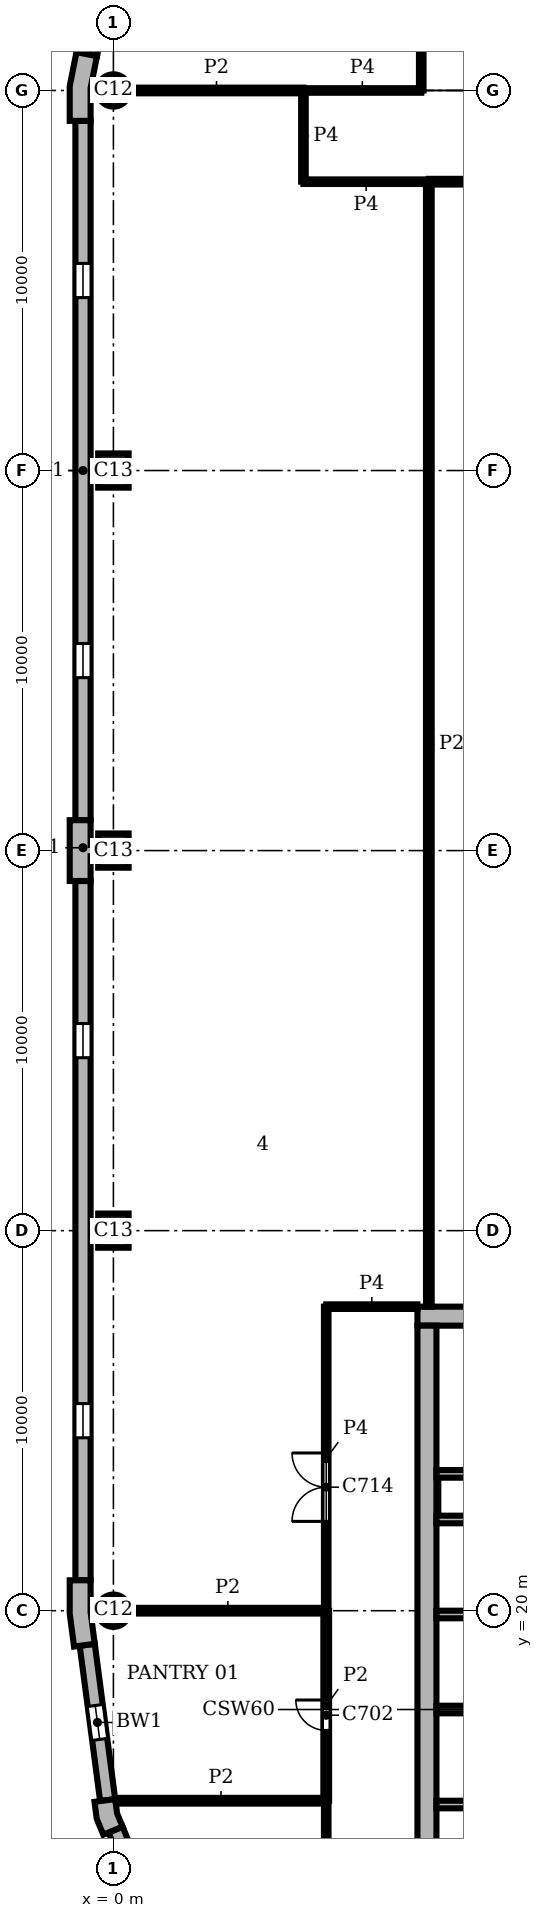
"""IFC4 building model, lengths in metres.
Left out: names, types, materials, properties, quantities, classifications, styles, units other than length and angle.
Written with IfcOpenShell. Run it as: python <this file> out.ifc"""

import sys

from ifc_helpers import new_model, si_unit, direction, frame, frame_2d, origin, origin_2d, place, context, subcontext, project, spatial, polyline, rectangle, circle, outline, extrude, element, fill, save


model = new_model("IFC4")
c1 = context("Model", 3, precision=1e-05, world=origin(), true_north=direction((0.0, 1.0)))
c2 = subcontext(c1, "Body", "Model", "MODEL_VIEW")
j1 = project(units=[si_unit("LENGTHUNIT", "METRE"), si_unit("PLANEANGLEUNIT", "RADIAN")], contexts=[c1])
p1 = place(None, origin())
s1 = spatial("IfcSite", under=j1, at=p1, CompositionType="ELEMENT")
p2 = place(p1, origin())
s2 = spatial("IfcBuilding", under=s1, at=p2, CompositionType="ELEMENT")
p3 = place(p2, frame((0.0, 0.0, 306.0)))
s3 = spatial("IfcBuildingStorey", under=s2, at=p3, CompositionType="ELEMENT", Elevation=306.0)
p4 = place(p3, frame((0.0, 60.0, 0.0), z_axis=(0.0, 0.0, 1.0), x_axis=(1.0, 0.0, 0.0)))
e1 = element("IfcColumn", 1, at=p4, inside=s3, PredefinedType="COLUMN", context=c2, shape_type="SweptSolid", body=[
    extrude(circle(Radius=0.425, at=origin_2d()), origin(), (0.0, 0.0, 1.0), 3.9),
])
for number, where, z_axis, x_axis in (
    (2, (0.0, 50.0, 0.0), (0.0, 0.0, 1.0), (0.0, 1.0, 0.0)),
    (3, (0.0, 40.0, 0.0), (0.0, 0.0, 1.0), (0.0, 1.0, 0.0)),
    (4, (0.0, 30.0, 0.0), (0.0, 0.0, 1.0), (0.0, 1.0, 0.0)),
):
    element("IfcColumn", number, at=place(p3, frame(where, z_axis=z_axis, x_axis=x_axis)), inside=s3, PredefinedType="COLUMN", context=c2, shape_type="SweptSolid", body=[
        extrude(rectangle(XDim=0.9, YDim=0.8, at=origin_2d()), origin(), (0.0, 0.0, 1.0), 3.9),
    ])
p5 = place(p3, frame((0.0, 20.0, 0.0), z_axis=(0.0, 0.0, 1.0), x_axis=(1.0, 0.0, 0.0)))
e5 = element("IfcColumn", 5, at=p5, inside=s3, PredefinedType="COLUMN", context=c2, shape_type="SweptSolid", body=[
    extrude(circle(Radius=0.425, at=origin_2d()), origin(), (0.0, 0.0, 1.0), 3.9),
])
p6 = place(p3, frame((28.0, 27.75, 0.0), z_axis=(0.0, 0.0, 1.0), x_axis=(-1.0, 0.0, 0.0)))
e6 = element("IfcWall", 6, at=p6, inside=s3, PredefinedType="SHEAR", context=c2, shape_type="SweptSolid", body=[
    extrude(rectangle(XDim=20.0, YDim=0.5, at=frame_2d((10.0, 0.0))), origin(), (0.0, 0.0, 1.0), 3.9),
])
p7 = place(p3, frame((8.25, 27.5, 0.0), z_axis=(0.0, 0.0, 1.0), x_axis=(0.0, -1.0, 0.0)))
e7 = element("IfcWall", 7, at=p7, inside=s3, PredefinedType="SHEAR", context=c2, shape_type="SweptSolid", body=[
    extrude(rectangle(XDim=19.0, YDim=0.5, at=frame_2d((9.5, 0.0))), origin(), (0.0, 0.0, 1.0), 3.9),
])
p8 = place(p3, origin())
e8 = element("IfcWall", 8, at=p8, inside=s3, PredefinedType="SOLIDWALL", context=c2, shape_type="SweptSolid", body=[
    extrude(outline(polyline([(-0.825, 60.98), (-0.972, 61.009), (-1.15, 60.113), (-1.15, 59.2), (-1.0, 59.2), (-0.6, 59.2), (-0.6, 60.059), (-0.432, 60.902), (-0.825, 60.98)])), origin(), (0.0, 0.0, 1.0), 3.9),
])
e9 = element("IfcWall", 9, at=p8, inside=s3, PredefinedType="SOLIDWALL", context=c2, shape_type="SweptSolid", body=[
    extrude(outline(polyline([(-0.6, 39.2), (-0.6, 39.85), (-0.45, 39.85), (-0.45, 40.15), (-0.6, 40.15), (-0.6, 40.8), (-1.0, 40.8), (-1.15, 40.8), (-1.15, 40.0), (-1.15, 39.2), (-1.0, 39.2), (-0.6, 39.2)])), origin(), (0.0, 0.0, 1.0), 3.9),
])
e10 = element("IfcWall", 10, at=p8, inside=s3, PredefinedType="SOLIDWALL", context=c2, shape_type="SweptSolid", body=[
    extrude(outline(polyline([(-1.0, 20.8), (-1.15, 20.8), (-1.15, 19.925), (-1.036, 19.057), (-0.887, 19.076), (-0.49, 19.128), (-0.6, 19.961), (-0.6, 20.8), (-1.0, 20.8)])), origin(), (0.0, 0.0, 1.0), 3.9),
])
e11 = element("IfcWall", 11, at=p8, inside=s3, PredefinedType="SOLIDWALL", context=c2, shape_type="SweptSolid", body=[
    extrude(outline(polyline([(-0.349, 14.99), (-0.498, 14.971), (-0.439, 14.523), (-0.266, 14.106), (-0.128, 14.164), (0.242, 14.317), (0.097, 14.667), (0.047, 15.043), (-0.349, 14.99)])), origin(), (0.0, 0.0, 1.0), 3.9),
])
p9 = place(p3, frame((0.299, 65.602, 0.0), z_axis=(0.0, 0.0, 1.0), x_axis=(-0.195098533057, -0.98078364709, 0.0)))
e12 = element("IfcWall", 12, at=p9, inside=s3, PredefinedType="SOLIDWALL", context=c2, shape_type="SweptSolid", body=[
    extrude(rectangle(XDim=4.753, YDim=0.4, at=frame_2d((2.376, 0.0))), origin(), (0.0, 0.0, 1.0), 3.9),
])
p10 = place(p9, frame((0.226, 0.0, 0.9)))
e13 = element("IfcOpeningElement", 13, at=p10, cuts=e12, PredefinedType="OPENING", context=c2, shape_type="SweptSolid", body=[
    extrude(rectangle(XDim=4.3, YDim=2.35, at=frame_2d((2.15, 1.175))), frame((0.0, 0.21, 0.0), z_axis=(0.0, -1.0, 0.0), x_axis=(1.0, 0.0, 0.0)), (0.0, 0.0, 1.0), 0.42),
])
p11 = place(p3, frame((-0.8, 59.2, 0.0), z_axis=(0.0, 0.0, 1.0), x_axis=(0.0, -1.0, 0.0)))
e14 = element("IfcWall", 14, at=p11, inside=s3, PredefinedType="SOLIDWALL", context=c2, shape_type="SweptSolid", body=[
    extrude(rectangle(XDim=18.4, YDim=0.4, at=frame_2d((9.2, 0.0))), origin(), (0.0, 0.0, 1.0), 3.9),
])
p12 = place(p11, frame((3.75, 0.0, 0.9)))
e15 = element("IfcOpeningElement", 15, at=p12, cuts=e14, PredefinedType="OPENING", context=c2, shape_type="SweptSolid", body=[
    extrude(rectangle(XDim=0.9, YDim=2.35, at=frame_2d((0.45, 1.175))), frame((0.0, 0.21, 0.0), z_axis=(0.0, -1.0, 0.0), x_axis=(1.0, 0.0, 0.0)), (0.0, 0.0, 1.0), 0.42),
])
p13 = place(p11, frame((13.75, 0.0, 0.9)))
e16 = element("IfcOpeningElement", 16, at=p13, cuts=e14, PredefinedType="OPENING", context=c2, shape_type="SweptSolid", body=[
    extrude(rectangle(XDim=0.9, YDim=2.35, at=frame_2d((0.45, 1.175))), frame((0.0, 0.21, 0.0), z_axis=(0.0, -1.0, 0.0), x_axis=(1.0, 0.0, 0.0)), (0.0, 0.0, 1.0), 0.42),
])
p14 = place(p3, frame((-0.8, 39.2, 0.0), z_axis=(0.0, 0.0, 1.0), x_axis=(0.0, -1.0, 0.0)))
e17 = element("IfcWall", 17, at=p14, inside=s3, PredefinedType="SOLIDWALL", context=c2, shape_type="SweptSolid", body=[
    extrude(rectangle(XDim=18.4, YDim=0.4, at=frame_2d((9.2, 0.0))), origin(), (0.0, 0.0, 1.0), 3.9),
])
p15 = place(p14, frame((3.75, 0.0, 0.9)))
e18 = element("IfcOpeningElement", 18, at=p15, cuts=e17, PredefinedType="OPENING", context=c2, shape_type="SweptSolid", body=[
    extrude(rectangle(XDim=0.9, YDim=2.35, at=frame_2d((0.45, 1.175))), frame((0.0, 0.21, 0.0), z_axis=(0.0, -1.0, 0.0), x_axis=(1.0, 0.0, 0.0)), (0.0, 0.0, 1.0), 0.42),
])
p16 = place(p14, frame((13.75, 0.0, 0.9)))
e19 = element("IfcOpeningElement", 19, at=p16, cuts=e17, PredefinedType="OPENING", context=c2, shape_type="SweptSolid", body=[
    extrude(rectangle(XDim=0.9, YDim=2.35, at=frame_2d((0.45, 1.175))), frame((0.0, 0.21, 0.0), z_axis=(0.0, -1.0, 0.0), x_axis=(1.0, 0.0, 0.0)), (0.0, 0.0, 1.0), 0.42),
])
p17 = place(p3, frame((-0.689, 19.102, 0.0), z_axis=(0.0, 0.0, 1.0), x_axis=(0.130514280502, -0.991446429508, 0.0)))
e20 = element("IfcWall", 20, at=p17, inside=s3, PredefinedType="SOLIDWALL", context=c2, shape_type="SweptSolid", body=[
    extrude(rectangle(XDim=4.121, YDim=0.4, at=frame_2d((2.061, 0.0))), origin(), (0.0, 0.0, 1.0), 3.9),
])
p18 = place(p17, frame((1.611, 0.0, 0.9)))
e21 = element("IfcOpeningElement", 21, at=p18, cuts=e20, PredefinedType="OPENING", context=c2, shape_type="SweptSolid", body=[
    extrude(rectangle(XDim=0.9, YDim=2.35, at=frame_2d((0.45, 1.175))), frame((0.0, 0.21, 0.0), z_axis=(0.0, -1.0, 0.0), x_axis=(1.0, 0.0, 0.0)), (0.0, 0.0, 1.0), 0.42),
])
p19 = place(p3, frame((0.057, 14.24, 0.0), z_axis=(0.0, 0.0, 1.0), x_axis=(0.382721546029, -0.923863744394, 0.0)))
e22 = element("IfcWall", 22, at=p19, inside=s3, PredefinedType="SOLIDWALL", context=c2, shape_type="SweptSolid", body=[
    extrude(rectangle(XDim=4.121, YDim=0.4, at=frame_2d((2.061, 0.0))), origin(), (0.0, 0.0, 1.0), 3.9),
])
p20 = place(p19, frame((1.611, 0.0, 0.9)))
e23 = element("IfcOpeningElement", 23, at=p20, cuts=e22, PredefinedType="OPENING", context=c2, shape_type="SweptSolid", body=[
    extrude(rectangle(XDim=0.9, YDim=2.35, at=frame_2d((0.45, 1.175))), frame((0.0, 0.21, 0.0), z_axis=(0.0, -1.0, 0.0), x_axis=(1.0, 0.0, 0.0)), (0.0, 0.0, 1.0), 0.42),
])
for number, where, z_axis, x_axis in (
    (24, (8.5, 14.9, 0.0), (0.0, 0.0, 1.0), (1.0, 0.0, 0.0)),
    (25, (8.5, 17.4, 0.0), (0.0, 0.0, 1.0), (1.0, 0.0, 0.0)),
    (26, (8.5, 19.9, 0.0), (0.0, 0.0, 1.0), (1.0, 0.0, 0.0)),
    (27, (8.5, 22.4, 0.0), (0.0, 0.0, 1.0), (1.0, 0.0, 0.0)),
):
    element("IfcWall", number, at=place(p3, frame(where, z_axis=z_axis, x_axis=x_axis)), inside=s3, PredefinedType="SHEAR", context=c2, shape_type="SweptSolid", body=[
        extrude(rectangle(XDim=3.2, YDim=0.2, at=frame_2d((1.6, 0.0))), origin(), (0.0, 0.0, 1.0), 3.58),
    ])
p21 = place(p3, frame((8.5, 23.6, 0.0), z_axis=(0.0, 0.0, 1.0), x_axis=(1.0, 0.0, 0.0)))
e28 = element("IfcWall", 28, at=p21, inside=s3, PredefinedType="SHEAR", context=c2, shape_type="SweptSolid", body=[
    extrude(rectangle(XDim=5.3, YDim=0.2, at=frame_2d((2.65, 0.0))), origin(), (0.0, 0.0, 1.0), 3.58),
])
p22 = place(p3, frame((5.6, 15.0, 0.0), z_axis=(0.0, 0.0, 1.0), x_axis=(0.0, 1.0, 0.0)))
e29 = element("IfcWall", 29, at=p22, inside=s3, PredefinedType="PARTITIONING", context=c2, shape_type="SweptSolid", body=[
    extrude(rectangle(XDim=5.0, YDim=0.15, at=frame_2d((2.5, 0.0))), origin(), (0.0, 0.0, 1.0), 3.58),
])
p23 = place(p22, frame((1.85, 0.0, 0.0)))
e30 = element("IfcOpeningElement", 30, at=p23, cuts=e29, PredefinedType="OPENING", context=c2, shape_type="SweptSolid", body=[
    extrude(rectangle(XDim=0.8, YDim=2.1, at=frame_2d((0.4, 1.05))), frame((0.0, 0.085, 0.0), z_axis=(0.0, -1.0, 0.0), x_axis=(1.0, 0.0, 0.0)), (0.0, 0.0, 1.0), 0.17),
])
p24 = place(p3, frame((8.3, 28.0, 0.0), z_axis=(0.0, 0.0, 1.0), x_axis=(0.0, 1.0, 0.0)))
e31 = element("IfcWall", 31, at=p24, inside=s3, PredefinedType="PARTITIONING", context=c2, shape_type="SweptSolid", body=[
    extrude(rectangle(XDim=29.6, YDim=0.15, at=frame_2d((14.8, 0.0))), origin(), (0.0, 0.0, 1.0), 3.58),
])
p25 = place(p3, frame((0.063, 15.0, 0.0), z_axis=(0.0, 0.0, 1.0), x_axis=(1.0, 0.0, 0.0)))
e32 = element("IfcWall", 32, at=p25, inside=s3, PredefinedType="PARTITIONING", context=c2, shape_type="SweptSolid", body=[
    extrude(rectangle(XDim=5.537, YDim=0.15, at=frame_2d((2.769, 0.0))), origin(), (0.0, 0.0, 1.0), 3.58),
])
p26 = place(p3, frame((0.425, 20.0, 0.0), z_axis=(0.0, 0.0, 1.0), x_axis=(1.0, 0.0, 0.0)))
e33 = element("IfcWall", 33, at=p26, inside=s3, PredefinedType="PARTITIONING", context=c2, shape_type="SweptSolid", body=[
    extrude(rectangle(XDim=5.175, YDim=0.15, at=frame_2d((2.587, 0.0))), origin(), (0.0, 0.0, 1.0), 3.58),
])
p27 = place(p3, frame((8.3, 57.6, 0.0), z_axis=(0.0, 0.0, 1.0), x_axis=(1.0, 0.0, 0.0)))
e34 = element("IfcWall", 34, at=p27, inside=s3, PredefinedType="PARTITIONING", context=c2, shape_type="SweptSolid", body=[
    extrude(rectangle(XDim=5.5, YDim=0.15, at=frame_2d((2.75, 0.0))), origin(), (0.0, 0.0, 1.0), 3.58),
])
p28 = place(p3, frame((0.425, 60.0, 0.0), z_axis=(0.0, 0.0, 1.0), x_axis=(1.0, 0.0, 0.0)))
e35 = element("IfcWall", 35, at=p28, inside=s3, PredefinedType="PARTITIONING", context=c2, shape_type="SweptSolid", body=[
    extrude(rectangle(XDim=4.575, YDim=0.15, at=frame_2d((2.288, 0.0))), origin(), (0.0, 0.0, 1.0), 3.58),
])
p29 = place(p3, frame((5.0, 57.6, 0.0), z_axis=(0.0, 0.0, 1.0), x_axis=(0.0, 1.0, 0.0)))
e36 = element("IfcWall", 36, at=p29, inside=s3, PredefinedType="PARTITIONING", context=c2, shape_type="SweptSolid", body=[
    extrude(rectangle(XDim=2.4, YDim=0.12, at=frame_2d((1.2, 0.0))), origin(), (0.0, 0.0, 1.0), 3.58),
])
p30 = place(p3, frame((5.6, 5.6, 0.0), z_axis=(0.0, 0.0, 1.0), x_axis=(0.0, 1.0, 0.0)))
e37 = element("IfcWall", 37, at=p30, inside=s3, PredefinedType="PARTITIONING", context=c2, shape_type="SweptSolid", body=[
    extrude(rectangle(XDim=9.4, YDim=0.12, at=frame_2d((4.7, 0.0))), origin(), (0.0, 0.0, 1.0), 3.58),
])
p31 = place(p30, frame((5.35, 0.0, 0.0)))
e38 = element("IfcOpeningElement", 38, at=p31, cuts=e37, PredefinedType="OPENING", context=c2, shape_type="SweptSolid", body=[
    extrude(rectangle(XDim=1.0, YDim=2.1, at=frame_2d((0.5, 1.05))), frame((0.0, 0.07, 0.0), z_axis=(0.0, -1.0, 0.0), x_axis=(1.0, 0.0, 0.0)), (0.0, 0.0, 1.0), 0.14),
])
p32 = place(p3, frame((5.6, 20.0, 0.0), z_axis=(0.0, 0.0, 1.0), x_axis=(0.0, 1.0, 0.0)))
e39 = element("IfcWall", 39, at=p32, inside=s3, PredefinedType="PARTITIONING", context=c2, shape_type="SweptSolid", body=[
    extrude(rectangle(XDim=8.0, YDim=0.12, at=frame_2d((4.0, 0.0))), origin(), (0.0, 0.0, 1.0), 3.58),
])
p33 = place(p32, frame((2.35, 0.0, 0.0)))
e40 = element("IfcOpeningElement", 40, at=p33, cuts=e39, PredefinedType="OPENING", context=c2, shape_type="SweptSolid", body=[
    extrude(rectangle(XDim=1.8, YDim=2.1, at=frame_2d((0.9, 1.05))), frame((0.0, 0.07, 0.0), z_axis=(0.0, -1.0, 0.0), x_axis=(1.0, 0.0, 0.0)), (0.0, 0.0, 1.0), 0.14),
])
p34 = place(p3, frame((8.1, 60.0, 0.0), z_axis=(0.0, 0.0, 1.0), x_axis=(0.0, 1.0, 0.0)))
e41 = element("IfcWall", 41, at=p34, inside=s3, PredefinedType="PARTITIONING", context=c2, shape_type="SweptSolid", body=[
    extrude(rectangle(XDim=6.4, YDim=0.12, at=frame_2d((3.2, 0.0))), origin(), (0.0, 0.0, 1.0), 3.58),
])
p35 = place(p34, frame((2.1, 0.0, 0.0)))
e42 = element("IfcOpeningElement", 42, at=p35, cuts=e41, PredefinedType="OPENING", context=c2, shape_type="SweptSolid", body=[
    extrude(rectangle(XDim=1.8, YDim=2.1, at=frame_2d((0.9, 1.05))), frame((0.0, 0.07, 0.0), z_axis=(0.0, -1.0, 0.0), x_axis=(1.0, 0.0, 0.0)), (0.0, 0.0, 1.0), 0.14),
])
p36 = place(p3, frame((5.6, 28.0, 0.0), z_axis=(0.0, 0.0, 1.0), x_axis=(1.0, 0.0, 0.0)))
e43 = element("IfcWall", 43, at=p36, inside=s3, PredefinedType="PARTITIONING", context=c2, shape_type="SweptSolid", body=[
    extrude(rectangle(XDim=2.4, YDim=0.12, at=frame_2d((1.2, 0.0))), origin(), (0.0, 0.0, 1.0), 3.58),
])
p37 = place(p3, frame((5.0, 57.6, 0.0), z_axis=(0.0, 0.0, 1.0), x_axis=(1.0, 0.0, 0.0)))
e44 = element("IfcWall", 44, at=p37, inside=s3, PredefinedType="PARTITIONING", context=c2, shape_type="SweptSolid", body=[
    extrude(rectangle(XDim=3.3, YDim=0.12, at=frame_2d((1.65, 0.0))), origin(), (0.0, 0.0, 1.0), 3.58),
])
p38 = place(p3, frame((5.0, 60.0, 0.0), z_axis=(0.0, 0.0, 1.0), x_axis=(1.0, 0.0, 0.0)))
e45 = element("IfcWall", 45, at=p38, inside=s3, PredefinedType="PARTITIONING", context=c2, shape_type="SweptSolid", body=[
    extrude(rectangle(XDim=3.1, YDim=0.12, at=frame_2d((1.55, 0.0))), origin(), (0.0, 0.0, 1.0), 3.58),
])
p39 = place(p12, origin())
e46 = element("IfcWindow", 46, at=p39, inside=s3, PartitioningType="SINGLE_PANEL", PredefinedType="WINDOW", context=c2, shape_type="SweptSolid", body=[
    extrude(rectangle(XDim=0.9, YDim=2.35, at=frame_2d((0.45, 1.175))), frame((0.0, 0.16, 0.0), z_axis=(0.0, -1.0, 0.0), x_axis=(1.0, 0.0, 0.0)), (0.0, 0.0, 1.0), 0.06),
])
fill(e15, e46)
p40 = place(p13, origin())
e47 = element("IfcWindow", 47, at=p40, inside=s3, PartitioningType="SINGLE_PANEL", PredefinedType="WINDOW", context=c2, shape_type="SweptSolid", body=[
    extrude(rectangle(XDim=0.9, YDim=2.35, at=frame_2d((0.45, 1.175))), frame((0.0, 0.16, 0.0), z_axis=(0.0, -1.0, 0.0), x_axis=(1.0, 0.0, 0.0)), (0.0, 0.0, 1.0), 0.06),
])
fill(e16, e47)
p41 = place(p15, origin())
e48 = element("IfcWindow", 48, at=p41, inside=s3, PartitioningType="SINGLE_PANEL", PredefinedType="WINDOW", context=c2, shape_type="SweptSolid", body=[
    extrude(rectangle(XDim=0.9, YDim=2.35, at=frame_2d((0.45, 1.175))), frame((0.0, 0.16, 0.0), z_axis=(0.0, -1.0, 0.0), x_axis=(1.0, 0.0, 0.0)), (0.0, 0.0, 1.0), 0.06),
])
fill(e18, e48)
p42 = place(p16, origin())
e49 = element("IfcWindow", 49, at=p42, inside=s3, PartitioningType="SINGLE_PANEL", PredefinedType="WINDOW", context=c2, shape_type="SweptSolid", body=[
    extrude(rectangle(XDim=0.9, YDim=2.35, at=frame_2d((0.45, 1.175))), frame((0.0, 0.16, 0.0), z_axis=(0.0, -1.0, 0.0), x_axis=(1.0, 0.0, 0.0)), (0.0, 0.0, 1.0), 0.06),
])
fill(e19, e49)
p43 = place(p18, origin())
e50 = element("IfcWindow", 50, at=p43, inside=s3, PartitioningType="SINGLE_PANEL", PredefinedType="WINDOW", context=c2, shape_type="SweptSolid", body=[
    extrude(rectangle(XDim=0.9, YDim=2.35, at=frame_2d((0.45, 1.175))), frame((0.0, 0.16, 0.0), z_axis=(0.0, -1.0, 0.0), x_axis=(1.0, 0.0, 0.0)), (0.0, 0.0, 1.0), 0.06),
])
fill(e21, e50)
p44 = place(p23, origin())
e51 = element("IfcDoor", 51, at=p44, inside=s3, OperationType="SINGLE_SWING_RIGHT", PredefinedType="DOOR", context=c2, shape_type="SweptSolid", body=[
    extrude(rectangle(XDim=0.8, YDim=2.1, at=frame_2d((0.4, 1.05))), frame((0.0, 0.025, 0.0), z_axis=(0.0, -1.0, 0.0), x_axis=(1.0, 0.0, 0.0)), (0.0, 0.0, 1.0), 0.05),
])
fill(e30, e51)
p45 = place(p33, origin())
e52 = element("IfcDoor", 52, at=p45, inside=s3, OperationType="DOUBLE_DOOR_SINGLE_SWING", PredefinedType="DOOR", context=c2, shape_type="SweptSolid", body=[
    extrude(rectangle(XDim=1.8, YDim=2.1, at=frame_2d((0.9, 1.05))), frame((0.0, 0.025, 0.0), z_axis=(0.0, -1.0, 0.0), x_axis=(1.0, 0.0, 0.0)), (0.0, 0.0, 1.0), 0.05),
])
fill(e40, e52)
save(model, sys.argv[1])
